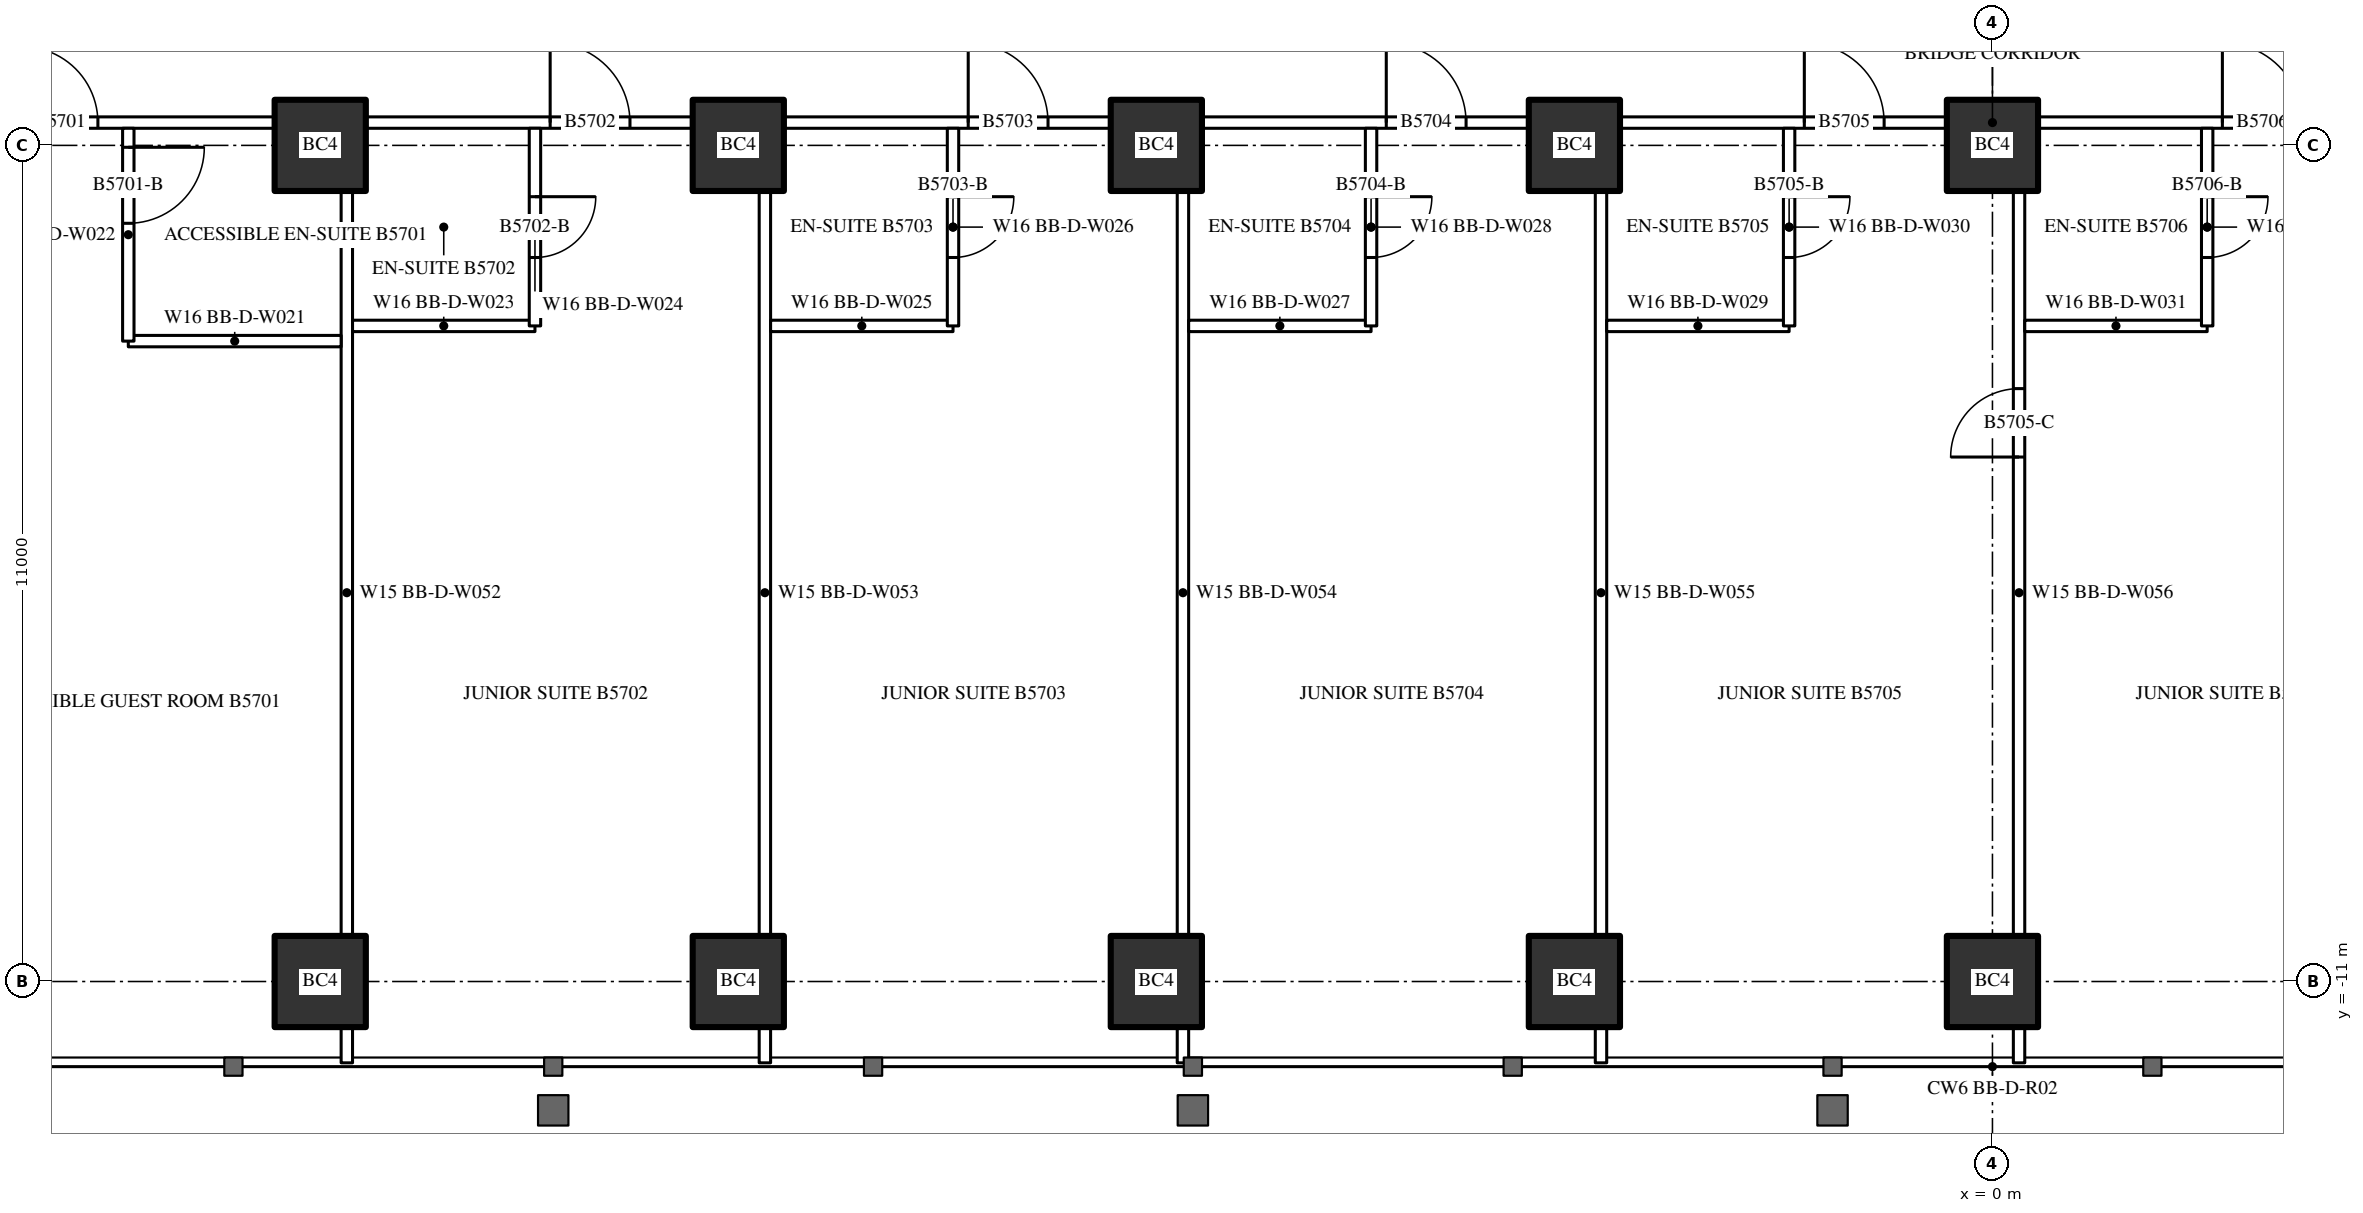
"""IFC4 building model, lengths in metres.
Left out: names, types, materials, properties, quantities, classifications, styles, units other than length and angle.
Written with IfcOpenShell. Run it as: python <this file> out.ifc"""

import sys

from ifc_helpers import new_model, si_unit, direction, frame, frame_2d, origin, origin_2d, place, context, subcontext, project, spatial, rectangle, hollow_rectangle, extrude, element, fill, save


model = new_model("IFC4")
c1 = context("Model", 3, precision=1e-05, world=origin(), true_north=direction((0.0, 1.0)))
c2 = subcontext(c1, "Body", "Model", "MODEL_VIEW")
j1 = project(units=[si_unit("LENGTHUNIT", "METRE"), si_unit("PLANEANGLEUNIT", "RADIAN")], contexts=[c1])
p1 = place(None, origin())
s1 = spatial("IfcSite", under=j1, at=p1, CompositionType="ELEMENT")
p2 = place(p1, origin())
s2 = spatial("IfcBuilding", under=s1, at=p2, CompositionType="ELEMENT")
p3 = place(p2, frame((0.0, 0.0, 215.3)))
s3 = spatial("IfcBuildingStorey", under=s2, at=p3, CompositionType="ELEMENT", Elevation=215.3)
for number, where, z_axis, x_axis in (
    (1, (-22.0, -11.0, 0.0), (0.0, 0.0, 1.0), (1.0, 0.0, 0.0)),
    (2, (-16.5, -11.0, 0.0), (0.0, 0.0, 1.0), (1.0, 0.0, 0.0)),
    (3, (-11.0, -11.0, 0.0), (0.0, 0.0, 1.0), (1.0, 0.0, 0.0)),
    (4, (-5.5, -11.0, 0.0), (0.0, 0.0, 1.0), (1.0, 0.0, 0.0)),
    (5, (0.0, -11.0, 0.0), (0.0, 0.0, 1.0), (1.0, 0.0, 0.0)),
    (6, (-22.0, 0.0, 0.0), (0.0, 0.0, 1.0), (1.0, 0.0, 0.0)),
    (7, (-16.5, 0.0, 0.0), (0.0, 0.0, 1.0), (1.0, 0.0, 0.0)),
    (8, (-11.0, 0.0, 0.0), (0.0, 0.0, 1.0), (1.0, 0.0, 0.0)),
    (9, (-5.5, 0.0, 0.0), (0.0, 0.0, 1.0), (1.0, 0.0, 0.0)),
    (10, (0.0, 0.0, 0.0), (0.0, 0.0, 1.0), (1.0, 0.0, 0.0)),
):
    element("IfcColumn", number, at=place(p3, frame(where, z_axis=z_axis, x_axis=x_axis)), inside=s3, PredefinedType="COLUMN", context=c2, shape_type="SweptSolid", body=[
        extrude(hollow_rectangle(XDim=1.2, YDim=1.2, WallThickness=0.12, at=origin_2d()), origin(), (0.0, 0.0, 1.0), 3.6),
    ])
p4 = place(p3, frame((-27.5, 0.3, 0.0), z_axis=(0.0, 0.0, 1.0), x_axis=(1.0, 0.0, 0.0)))
e11 = element("IfcWall", 11, at=p4, inside=s3, PredefinedType="PARTITIONING", context=c2, shape_type="SweptSolid", body=[
    extrude(rectangle(XDim=55.0, YDim=0.15, at=frame_2d((27.5, 0.0))), origin(), (0.0, 0.0, 1.0), 2.4),
])
p5 = place(p4, frame((1.575, 0.0, 0.0)))
e12 = element("IfcOpeningElement", 12, at=p5, cuts=e11, PredefinedType="OPENING", context=c2, shape_type="SweptSolid", body=[
    extrude(rectangle(XDim=1.0, YDim=2.2, at=frame_2d((0.5, 1.1))), frame((0.0, 0.085, 0.0), z_axis=(0.0, -1.0, 0.0), x_axis=(1.0, 0.0, 0.0)), (0.0, 0.0, 1.0), 0.17),
])
p6 = place(p4, frame((8.525, 0.0, 0.0)))
e13 = element("IfcOpeningElement", 13, at=p6, cuts=e11, PredefinedType="OPENING", context=c2, shape_type="SweptSolid", body=[
    extrude(rectangle(XDim=1.05, YDim=2.4, at=frame_2d((0.525, 1.2))), frame((0.0, 0.085, 0.0), z_axis=(0.0, -1.0, 0.0), x_axis=(1.0, 0.0, 0.0)), (0.0, 0.0, 1.0), 0.17),
])
p7 = place(p4, frame((14.025, 0.0, 0.0)))
e14 = element("IfcOpeningElement", 14, at=p7, cuts=e11, PredefinedType="OPENING", context=c2, shape_type="SweptSolid", body=[
    extrude(rectangle(XDim=1.05, YDim=2.4, at=frame_2d((0.525, 1.2))), frame((0.0, 0.085, 0.0), z_axis=(0.0, -1.0, 0.0), x_axis=(1.0, 0.0, 0.0)), (0.0, 0.0, 1.0), 0.17),
])
p8 = place(p4, frame((19.525, 0.0, 0.0)))
e15 = element("IfcOpeningElement", 15, at=p8, cuts=e11, PredefinedType="OPENING", context=c2, shape_type="SweptSolid", body=[
    extrude(rectangle(XDim=1.05, YDim=2.4, at=frame_2d((0.525, 1.2))), frame((0.0, 0.085, 0.0), z_axis=(0.0, -1.0, 0.0), x_axis=(1.0, 0.0, 0.0)), (0.0, 0.0, 1.0), 0.17),
])
p9 = place(p4, frame((25.025, 0.0, 0.0)))
e16 = element("IfcOpeningElement", 16, at=p9, cuts=e11, PredefinedType="OPENING", context=c2, shape_type="SweptSolid", body=[
    extrude(rectangle(XDim=1.05, YDim=2.4, at=frame_2d((0.525, 1.2))), frame((0.0, 0.085, 0.0), z_axis=(0.0, -1.0, 0.0), x_axis=(1.0, 0.0, 0.0)), (0.0, 0.0, 1.0), 0.17),
])
p10 = place(p4, frame((30.525, 0.0, 0.0)))
e17 = element("IfcOpeningElement", 17, at=p10, cuts=e11, PredefinedType="OPENING", context=c2, shape_type="SweptSolid", body=[
    extrude(rectangle(XDim=1.05, YDim=2.4, at=frame_2d((0.525, 1.2))), frame((0.0, 0.085, 0.0), z_axis=(0.0, -1.0, 0.0), x_axis=(1.0, 0.0, 0.0)), (0.0, 0.0, 1.0), 0.17),
])
p11 = place(p4, frame((36.025, 0.0, 0.0)))
e18 = element("IfcOpeningElement", 18, at=p11, cuts=e11, PredefinedType="OPENING", context=c2, shape_type="SweptSolid", body=[
    extrude(rectangle(XDim=1.05, YDim=2.4, at=frame_2d((0.525, 1.2))), frame((0.0, 0.085, 0.0), z_axis=(0.0, -1.0, 0.0), x_axis=(1.0, 0.0, 0.0)), (0.0, 0.0, 1.0), 0.17),
])
p12 = place(p4, frame((41.525, 0.0, 0.0)))
e19 = element("IfcOpeningElement", 19, at=p12, cuts=e11, PredefinedType="OPENING", context=c2, shape_type="SweptSolid", body=[
    extrude(rectangle(XDim=1.05, YDim=2.4, at=frame_2d((0.525, 1.2))), frame((0.0, 0.085, 0.0), z_axis=(0.0, -1.0, 0.0), x_axis=(1.0, 0.0, 0.0)), (0.0, 0.0, 1.0), 0.17),
])
p13 = place(p4, frame((47.025, 0.0, 0.0)))
e20 = element("IfcOpeningElement", 20, at=p13, cuts=e11, PredefinedType="OPENING", context=c2, shape_type="SweptSolid", body=[
    extrude(rectangle(XDim=1.05, YDim=2.4, at=frame_2d((0.525, 1.2))), frame((0.0, 0.085, 0.0), z_axis=(0.0, -1.0, 0.0), x_axis=(1.0, 0.0, 0.0)), (0.0, 0.0, 1.0), 0.17),
])
p14 = place(p4, frame((52.525, 0.0, 0.0)))
e21 = element("IfcOpeningElement", 21, at=p14, cuts=e11, PredefinedType="OPENING", context=c2, shape_type="SweptSolid", body=[
    extrude(rectangle(XDim=1.05, YDim=2.4, at=frame_2d((0.525, 1.2))), frame((0.0, 0.085, 0.0), z_axis=(0.0, -1.0, 0.0), x_axis=(1.0, 0.0, 0.0)), (0.0, 0.0, 1.0), 0.17),
])
for number, where, z_axis, x_axis in (
    (22, (-21.65, -12.07, 0.0), (0.0, 0.0, 1.0), (0.0, 1.0, 0.0)),
    (23, (-16.15, -12.07, 0.0), (0.0, 0.0, 1.0), (0.0, 1.0, 0.0)),
    (24, (-10.65, -12.07, 0.0), (0.0, 0.0, 1.0), (0.0, 1.0, 0.0)),
    (25, (-5.15, -12.07, 0.0), (0.0, 0.0, 1.0), (0.0, 1.0, 0.0)),
):
    element("IfcWall", number, at=place(p3, frame(where, z_axis=z_axis, x_axis=x_axis)), inside=s3, PredefinedType="PARTITIONING", context=c2, shape_type="SweptSolid", body=[
        extrude(rectangle(XDim=12.37, YDim=0.15, at=frame_2d((6.185, 0.0))), origin(), (0.0, 0.0, 1.0), 3.4),
    ])
p15 = place(p3, frame((0.35, -12.07, 0.0), z_axis=(0.0, 0.0, 1.0), x_axis=(0.0, 1.0, 0.0)))
e26 = element("IfcWall", 26, at=p15, inside=s3, PredefinedType="PARTITIONING", context=c2, shape_type="SweptSolid", body=[
    extrude(rectangle(XDim=12.37, YDim=0.15, at=frame_2d((6.185, 0.0))), origin(), (0.0, 0.0, 1.0), 3.4),
])
p16 = place(p15, frame((7.97, 0.0, 0.0)))
e27 = element("IfcOpeningElement", 27, at=p16, cuts=e26, PredefinedType="OPENING", context=c2, shape_type="SweptSolid", body=[
    extrude(rectangle(XDim=0.9, YDim=2.2, at=frame_2d((0.45, 1.1))), frame((0.0, 0.085, 0.0), z_axis=(0.0, -1.0, 0.0), x_axis=(1.0, 0.0, 0.0)), (0.0, 0.0, 1.0), 0.17),
])
p17 = place(p3, frame((-24.525, -2.575, 0.0), z_axis=(0.0, 0.0, 1.0), x_axis=(1.0, 0.0, 0.0)))
e28 = element("IfcWall", 28, at=p17, inside=s3, PredefinedType="PARTITIONING", context=c2, shape_type="SweptSolid", body=[
    extrude(rectangle(XDim=2.8, YDim=0.15, at=frame_2d((1.4, 0.0))), origin(), (0.0, 0.0, 1.0), 3.4),
])
p18 = place(p3, frame((-24.525, -2.575, 0.0), z_axis=(0.0, 0.0, 1.0), x_axis=(0.0, 1.0, 0.0)))
e29 = element("IfcWall", 29, at=p18, inside=s3, PredefinedType="PARTITIONING", context=c2, shape_type="SweptSolid", body=[
    extrude(rectangle(XDim=2.8, YDim=0.15, at=frame_2d((1.4, 0.0))), origin(), (0.0, 0.0, 1.0), 3.4),
])
p19 = place(p18, frame((1.55, 0.0, 0.0)))
e30 = element("IfcOpeningElement", 30, at=p19, cuts=e29, PredefinedType="OPENING", context=c2, shape_type="SweptSolid", body=[
    extrude(rectangle(XDim=1.0, YDim=2.2, at=frame_2d((0.5, 1.1))), frame((0.0, 0.085, 0.0), z_axis=(0.0, -1.0, 0.0), x_axis=(1.0, 0.0, 0.0)), (0.0, 0.0, 1.0), 0.17),
])
p20 = place(p3, frame((-21.575, -2.375, 0.0), z_axis=(0.0, 0.0, 1.0), x_axis=(1.0, 0.0, 0.0)))
e31 = element("IfcWall", 31, at=p20, inside=s3, PredefinedType="PARTITIONING", context=c2, shape_type="SweptSolid", body=[
    extrude(rectangle(XDim=2.4, YDim=0.15, at=frame_2d((1.2, 0.0))), origin(), (0.0, 0.0, 1.0), 3.4),
])
p21 = place(p3, frame((-19.175, -2.375, 0.0), z_axis=(0.0, 0.0, 1.0), x_axis=(0.0, 1.0, 0.0)))
e32 = element("IfcWall", 32, at=p21, inside=s3, PredefinedType="PARTITIONING", context=c2, shape_type="SweptSolid", body=[
    extrude(rectangle(XDim=2.6, YDim=0.15, at=frame_2d((1.3, 0.0))), origin(), (0.0, 0.0, 1.0), 3.4),
])
p22 = place(p21, frame((0.9, 0.0, 0.0)))
e33 = element("IfcOpeningElement", 33, at=p22, cuts=e32, PredefinedType="OPENING", context=c2, shape_type="SweptSolid", body=[
    extrude(rectangle(XDim=0.8, YDim=2.2, at=frame_2d((0.4, 1.1))), frame((0.0, 0.085, 0.0), z_axis=(0.0, -1.0, 0.0), x_axis=(1.0, 0.0, 0.0)), (0.0, 0.0, 1.0), 0.17),
])
p23 = place(p3, frame((-16.075, -2.375, 0.0), z_axis=(0.0, 0.0, 1.0), x_axis=(1.0, 0.0, 0.0)))
e34 = element("IfcWall", 34, at=p23, inside=s3, PredefinedType="PARTITIONING", context=c2, shape_type="SweptSolid", body=[
    extrude(rectangle(XDim=2.4, YDim=0.15, at=frame_2d((1.2, 0.0))), origin(), (0.0, 0.0, 1.0), 3.4),
])
p24 = place(p3, frame((-13.675, -2.375, 0.0), z_axis=(0.0, 0.0, 1.0), x_axis=(0.0, 1.0, 0.0)))
e35 = element("IfcWall", 35, at=p24, inside=s3, PredefinedType="PARTITIONING", context=c2, shape_type="SweptSolid", body=[
    extrude(rectangle(XDim=2.6, YDim=0.15, at=frame_2d((1.3, 0.0))), origin(), (0.0, 0.0, 1.0), 3.4),
])
p25 = place(p24, frame((0.9, 0.0, 0.0)))
e36 = element("IfcOpeningElement", 36, at=p25, cuts=e35, PredefinedType="OPENING", context=c2, shape_type="SweptSolid", body=[
    extrude(rectangle(XDim=0.8, YDim=2.2, at=frame_2d((0.4, 1.1))), frame((0.0, 0.085, 0.0), z_axis=(0.0, -1.0, 0.0), x_axis=(1.0, 0.0, 0.0)), (0.0, 0.0, 1.0), 0.17),
])
p26 = place(p3, frame((-10.575, -2.375, 0.0), z_axis=(0.0, 0.0, 1.0), x_axis=(1.0, 0.0, 0.0)))
e37 = element("IfcWall", 37, at=p26, inside=s3, PredefinedType="PARTITIONING", context=c2, shape_type="SweptSolid", body=[
    extrude(rectangle(XDim=2.4, YDim=0.15, at=frame_2d((1.2, 0.0))), origin(), (0.0, 0.0, 1.0), 3.4),
])
p27 = place(p3, frame((-8.175, -2.375, 0.0), z_axis=(0.0, 0.0, 1.0), x_axis=(0.0, 1.0, 0.0)))
e38 = element("IfcWall", 38, at=p27, inside=s3, PredefinedType="PARTITIONING", context=c2, shape_type="SweptSolid", body=[
    extrude(rectangle(XDim=2.6, YDim=0.15, at=frame_2d((1.3, 0.0))), origin(), (0.0, 0.0, 1.0), 3.4),
])
p28 = place(p27, frame((0.9, 0.0, 0.0)))
e39 = element("IfcOpeningElement", 39, at=p28, cuts=e38, PredefinedType="OPENING", context=c2, shape_type="SweptSolid", body=[
    extrude(rectangle(XDim=0.8, YDim=2.2, at=frame_2d((0.4, 1.1))), frame((0.0, 0.085, 0.0), z_axis=(0.0, -1.0, 0.0), x_axis=(1.0, 0.0, 0.0)), (0.0, 0.0, 1.0), 0.17),
])
p29 = place(p3, frame((-5.075, -2.375, 0.0), z_axis=(0.0, 0.0, 1.0), x_axis=(1.0, 0.0, 0.0)))
e40 = element("IfcWall", 40, at=p29, inside=s3, PredefinedType="PARTITIONING", context=c2, shape_type="SweptSolid", body=[
    extrude(rectangle(XDim=2.4, YDim=0.15, at=frame_2d((1.2, 0.0))), origin(), (0.0, 0.0, 1.0), 3.4),
])
p30 = place(p3, frame((-2.675, -2.375, 0.0), z_axis=(0.0, 0.0, 1.0), x_axis=(0.0, 1.0, 0.0)))
e41 = element("IfcWall", 41, at=p30, inside=s3, PredefinedType="PARTITIONING", context=c2, shape_type="SweptSolid", body=[
    extrude(rectangle(XDim=2.6, YDim=0.15, at=frame_2d((1.3, 0.0))), origin(), (0.0, 0.0, 1.0), 3.4),
])
p31 = place(p30, frame((0.9, 0.0, 0.0)))
e42 = element("IfcOpeningElement", 42, at=p31, cuts=e41, PredefinedType="OPENING", context=c2, shape_type="SweptSolid", body=[
    extrude(rectangle(XDim=0.8, YDim=2.2, at=frame_2d((0.4, 1.1))), frame((0.0, 0.085, 0.0), z_axis=(0.0, -1.0, 0.0), x_axis=(1.0, 0.0, 0.0)), (0.0, 0.0, 1.0), 0.17),
])
p32 = place(p3, frame((0.425, -2.375, 0.0), z_axis=(0.0, 0.0, 1.0), x_axis=(1.0, 0.0, 0.0)))
e43 = element("IfcWall", 43, at=p32, inside=s3, PredefinedType="PARTITIONING", context=c2, shape_type="SweptSolid", body=[
    extrude(rectangle(XDim=2.4, YDim=0.15, at=frame_2d((1.2, 0.0))), origin(), (0.0, 0.0, 1.0), 3.4),
])
p33 = place(p3, frame((2.825, -2.375, 0.0), z_axis=(0.0, 0.0, 1.0), x_axis=(0.0, 1.0, 0.0)))
e44 = element("IfcWall", 44, at=p33, inside=s3, PredefinedType="PARTITIONING", context=c2, shape_type="SweptSolid", body=[
    extrude(rectangle(XDim=2.6, YDim=0.15, at=frame_2d((1.3, 0.0))), origin(), (0.0, 0.0, 1.0), 3.4),
])
p34 = place(p33, frame((0.9, 0.0, 0.0)))
e45 = element("IfcOpeningElement", 45, at=p34, cuts=e44, PredefinedType="OPENING", context=c2, shape_type="SweptSolid", body=[
    extrude(rectangle(XDim=0.8, YDim=2.2, at=frame_2d((0.4, 1.1))), frame((0.0, 0.085, 0.0), z_axis=(0.0, -1.0, 0.0), x_axis=(1.0, 0.0, 0.0)), (0.0, 0.0, 1.0), 0.17),
])
p35 = place(p19, origin())
e46 = element("IfcDoor", 46, at=p35, inside=s3, OperationType="SINGLE_SWING_RIGHT", PredefinedType="DOOR", context=c2, shape_type="SweptSolid", body=[
    extrude(rectangle(XDim=1.0, YDim=2.2, at=frame_2d((0.5, 1.1))), frame((0.0, 0.025, 0.0), z_axis=(0.0, -1.0, 0.0), x_axis=(1.0, 0.0, 0.0)), (0.0, 0.0, 1.0), 0.05),
])
fill(e30, e46)
p36 = place(p5, origin())
e47 = element("IfcDoor", 47, at=p36, inside=s3, OperationType="SINGLE_SWING_LEFT", PredefinedType="DOOR", context=c2, shape_type="SweptSolid", body=[
    extrude(rectangle(XDim=1.0, YDim=2.2, at=frame_2d((0.5, 1.1))), frame((0.0, 0.025, 0.0), z_axis=(0.0, -1.0, 0.0), x_axis=(1.0, 0.0, 0.0)), (0.0, 0.0, 1.0), 0.05),
])
fill(e12, e47)
p37 = place(p22, origin())
e48 = element("IfcDoor", 48, at=p37, inside=s3, OperationType="SINGLE_SWING_RIGHT", PredefinedType="DOOR", context=c2, shape_type="SweptSolid", body=[
    extrude(rectangle(XDim=0.8, YDim=2.2, at=frame_2d((0.4, 1.1))), frame((0.0, 0.025, 0.0), z_axis=(0.0, -1.0, 0.0), x_axis=(1.0, 0.0, 0.0)), (0.0, 0.0, 1.0), 0.05),
])
fill(e33, e48)
p38 = place(p6, origin())
e49 = element("IfcDoor", 49, at=p38, inside=s3, OperationType="SINGLE_SWING_LEFT", PredefinedType="DOOR", context=c2, shape_type="SweptSolid", body=[
    extrude(rectangle(XDim=1.05, YDim=2.4, at=frame_2d((0.525, 1.2))), frame((0.0, 0.025, 0.0), z_axis=(0.0, -1.0, 0.0), x_axis=(1.0, 0.0, 0.0)), (0.0, 0.0, 1.0), 0.05),
])
fill(e13, e49)
p39 = place(p25, origin())
e50 = element("IfcDoor", 50, at=p39, inside=s3, OperationType="SINGLE_SWING_RIGHT", PredefinedType="DOOR", context=c2, shape_type="SweptSolid", body=[
    extrude(rectangle(XDim=0.8, YDim=2.2, at=frame_2d((0.4, 1.1))), frame((0.0, 0.025, 0.0), z_axis=(0.0, -1.0, 0.0), x_axis=(1.0, 0.0, 0.0)), (0.0, 0.0, 1.0), 0.05),
])
fill(e36, e50)
p40 = place(p7, origin())
e51 = element("IfcDoor", 51, at=p40, inside=s3, OperationType="SINGLE_SWING_LEFT", PredefinedType="DOOR", context=c2, shape_type="SweptSolid", body=[
    extrude(rectangle(XDim=1.05, YDim=2.4, at=frame_2d((0.525, 1.2))), frame((0.0, 0.025, 0.0), z_axis=(0.0, -1.0, 0.0), x_axis=(1.0, 0.0, 0.0)), (0.0, 0.0, 1.0), 0.05),
])
fill(e14, e51)
p41 = place(p28, origin())
e52 = element("IfcDoor", 52, at=p41, inside=s3, OperationType="SINGLE_SWING_RIGHT", PredefinedType="DOOR", context=c2, shape_type="SweptSolid", body=[
    extrude(rectangle(XDim=0.8, YDim=2.2, at=frame_2d((0.4, 1.1))), frame((0.0, 0.025, 0.0), z_axis=(0.0, -1.0, 0.0), x_axis=(1.0, 0.0, 0.0)), (0.0, 0.0, 1.0), 0.05),
])
fill(e39, e52)
p42 = place(p8, origin())
e53 = element("IfcDoor", 53, at=p42, inside=s3, OperationType="SINGLE_SWING_LEFT", PredefinedType="DOOR", context=c2, shape_type="SweptSolid", body=[
    extrude(rectangle(XDim=1.05, YDim=2.4, at=frame_2d((0.525, 1.2))), frame((0.0, 0.025, 0.0), z_axis=(0.0, -1.0, 0.0), x_axis=(1.0, 0.0, 0.0)), (0.0, 0.0, 1.0), 0.05),
])
fill(e15, e53)
p43 = place(p31, origin())
e54 = element("IfcDoor", 54, at=p43, inside=s3, OperationType="SINGLE_SWING_RIGHT", PredefinedType="DOOR", context=c2, shape_type="SweptSolid", body=[
    extrude(rectangle(XDim=0.8, YDim=2.2, at=frame_2d((0.4, 1.1))), frame((0.0, 0.025, 0.0), z_axis=(0.0, -1.0, 0.0), x_axis=(1.0, 0.0, 0.0)), (0.0, 0.0, 1.0), 0.05),
])
fill(e42, e54)
p44 = place(p9, origin())
e55 = element("IfcDoor", 55, at=p44, inside=s3, OperationType="SINGLE_SWING_LEFT", PredefinedType="DOOR", context=c2, shape_type="SweptSolid", body=[
    extrude(rectangle(XDim=1.05, YDim=2.4, at=frame_2d((0.525, 1.2))), frame((0.0, 0.025, 0.0), z_axis=(0.0, -1.0, 0.0), x_axis=(1.0, 0.0, 0.0)), (0.0, 0.0, 1.0), 0.05),
])
fill(e16, e55)
p45 = place(p34, origin())
e56 = element("IfcDoor", 56, at=p45, inside=s3, OperationType="SINGLE_SWING_RIGHT", PredefinedType="DOOR", context=c2, shape_type="SweptSolid", body=[
    extrude(rectangle(XDim=0.8, YDim=2.2, at=frame_2d((0.4, 1.1))), frame((0.0, 0.025, 0.0), z_axis=(0.0, -1.0, 0.0), x_axis=(1.0, 0.0, 0.0)), (0.0, 0.0, 1.0), 0.05),
])
fill(e45, e56)
p46 = place(p10, origin())
e57 = element("IfcDoor", 57, at=p46, inside=s3, OperationType="SINGLE_SWING_LEFT", PredefinedType="DOOR", context=c2, shape_type="SweptSolid", body=[
    extrude(rectangle(XDim=1.05, YDim=2.4, at=frame_2d((0.525, 1.2))), frame((0.0, 0.025, 0.0), z_axis=(0.0, -1.0, 0.0), x_axis=(1.0, 0.0, 0.0)), (0.0, 0.0, 1.0), 0.05),
])
fill(e17, e57)
p47 = place(p16, origin())
e58 = element("IfcDoor", 58, at=p47, inside=s3, OperationType="SINGLE_SWING_LEFT", PredefinedType="DOOR", context=c2, shape_type="SweptSolid", body=[
    extrude(rectangle(XDim=0.9, YDim=2.2, at=frame_2d((0.45, 1.1))), frame((0.0, 0.025, 0.0), z_axis=(0.0, -1.0, 0.0), x_axis=(1.0, 0.0, 0.0)), (0.0, 0.0, 1.0), 0.05),
])
fill(e27, e58)
save(model, sys.argv[1])
